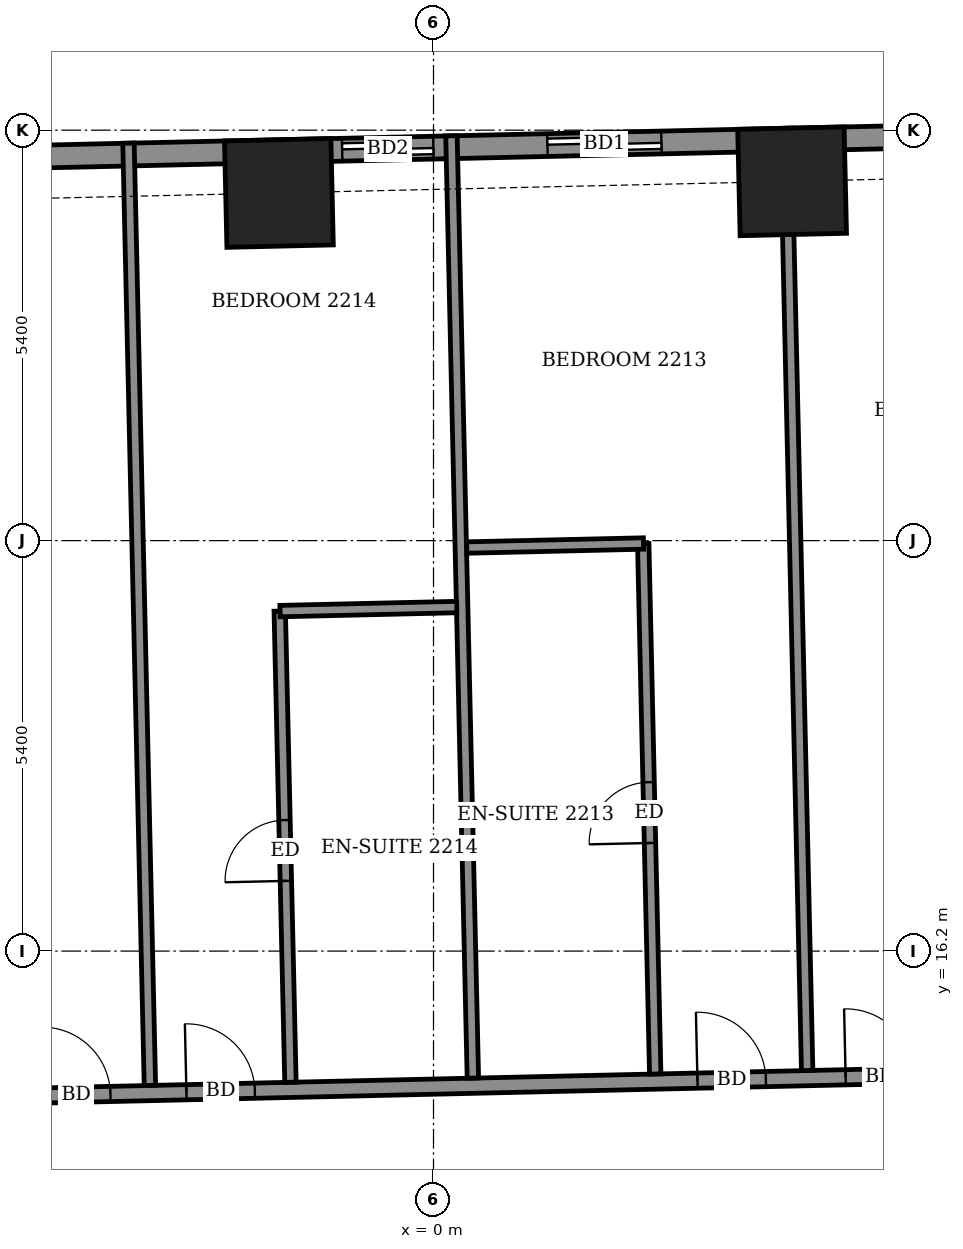
"""IFC4 building model, lengths in metres.
Left out: names, types, materials, properties, quantities, classifications, styles, units other than length and angle.
Written with IfcOpenShell. Run it as: python <this file> out.ifc"""

import sys

from ifc_helpers import new_model, si_unit, direction, frame, frame_2d, origin, origin_2d, place, context, subcontext, project, spatial, rectangle, extrude, element, fill, save


model = new_model("IFC4")
c1 = context("Model", 3, precision=1e-05, world=origin(), true_north=direction((0.0, 1.0)))
c2 = subcontext(c1, "Body", "Model", "MODEL_VIEW")
j1 = project(units=[si_unit("LENGTHUNIT", "METRE"), si_unit("PLANEANGLEUNIT", "RADIAN")], contexts=[c1])
p1 = place(None, origin())
s1 = spatial("IfcSite", under=j1, at=p1, CompositionType="ELEMENT")
p2 = place(p1, origin())
s2 = spatial("IfcBuilding", under=s1, at=p2, CompositionType="ELEMENT")
p3 = place(p2, frame((0.0, 0.0, 90.1)))
s3 = spatial("IfcBuildingStorey", under=s2, at=p3, CompositionType="ELEMENT", Elevation=90.1)
for number, where, z_axis, x_axis in (
    (1, (4.718, 26.327, -0.55), (0.0, 0.0, 1.0), (-1.0, -0.023, 0.0)),
    (2, (-2.034, 26.174, -0.55), (0.0, 0.0, 1.0), (-1.0, -0.023, 0.0)),
):
    element("IfcColumn", number, at=place(p3, frame(where, z_axis=z_axis, x_axis=x_axis)), inside=s3, PredefinedType="COLUMN", context=c2, shape_type="SweptSolid", body=[
        extrude(rectangle(XDim=1.4, YDim=1.4, at=origin_2d()), origin(), (0.0, 0.0, 1.0), 3.6),
    ])
p4 = place(p3, frame((24.809, 27.333, 0.0), z_axis=(0.0, 0.0, 1.0), x_axis=(-0.999742489858, -0.022692597327, 0.0)))
e3 = element("IfcWall", 3, at=p4, inside=s3, PredefinedType="SOLIDWALL", context=c2, shape_type="SweptSolid", body=[
    extrude(rectangle(XDim=46.972, YDim=0.3, at=frame_2d((23.486, 0.0))), origin(), (0.0, 0.0, 1.0), 3.05),
])
p5 = place(p4, frame((1.311, 0.0, 0.0)))
e4 = element("IfcOpeningElement", 4, at=p5, cuts=e3, PredefinedType="OPENING", context=c2, shape_type="SweptSolid", body=[
    extrude(rectangle(XDim=1.2, YDim=2.4, at=frame_2d((0.6, 1.2))), frame((0.0, 0.16, 0.0), z_axis=(0.0, -1.0, 0.0), x_axis=(1.0, 0.0, 0.0)), (0.0, 0.0, 1.0), 0.32),
])
p6 = place(p4, frame((3.763, 0.0, 0.0)))
e5 = element("IfcOpeningElement", 5, at=p6, cuts=e3, PredefinedType="OPENING", context=c2, shape_type="SweptSolid", body=[
    extrude(rectangle(XDim=1.5, YDim=2.4, at=frame_2d((0.75, 1.2))), frame((0.0, 0.16, 0.0), z_axis=(0.0, -1.0, 0.0), x_axis=(1.0, 0.0, 0.0)), (0.0, 0.0, 1.0), 0.32),
])
p7 = place(p4, frame((8.647, 0.0, 0.0)))
e6 = element("IfcOpeningElement", 6, at=p7, cuts=e3, PredefinedType="OPENING", context=c2, shape_type="SweptSolid", body=[
    extrude(rectangle(XDim=1.5, YDim=2.4, at=frame_2d((0.75, 1.2))), frame((0.0, 0.16, 0.0), z_axis=(0.0, -1.0, 0.0), x_axis=(1.0, 0.0, 0.0)), (0.0, 0.0, 1.0), 0.32),
])
p8 = place(p4, frame((14.239, 0.0, 0.0)))
e7 = element("IfcOpeningElement", 7, at=p8, cuts=e3, PredefinedType="OPENING", context=c2, shape_type="SweptSolid", body=[
    extrude(rectangle(XDim=1.2, YDim=2.4, at=frame_2d((0.6, 1.2))), frame((0.0, 0.16, 0.0), z_axis=(0.0, -1.0, 0.0), x_axis=(1.0, 0.0, 0.0)), (0.0, 0.0, 1.0), 0.32),
])
p9 = place(p4, frame((17.016, 0.0, 0.0)))
e8 = element("IfcOpeningElement", 8, at=p9, cuts=e3, PredefinedType="OPENING", context=c2, shape_type="SweptSolid", body=[
    extrude(rectangle(XDim=1.5, YDim=2.4, at=frame_2d((0.75, 1.2))), frame((0.0, 0.16, 0.0), z_axis=(0.0, -1.0, 0.0), x_axis=(1.0, 0.0, 0.0)), (0.0, 0.0, 1.0), 0.32),
])
p10 = place(p4, frame((21.816, 0.0, 0.0)))
e9 = element("IfcOpeningElement", 9, at=p10, cuts=e3, PredefinedType="OPENING", context=c2, shape_type="SweptSolid", body=[
    extrude(rectangle(XDim=1.5, YDim=2.4, at=frame_2d((0.75, 1.2))), frame((0.0, 0.16, 0.0), z_axis=(0.0, -1.0, 0.0), x_axis=(1.0, 0.0, 0.0)), (0.0, 0.0, 1.0), 0.32),
])
p11 = place(p4, frame((24.817, 0.0, 0.0)))
e10 = element("IfcOpeningElement", 10, at=p11, cuts=e3, PredefinedType="OPENING", context=c2, shape_type="SweptSolid", body=[
    extrude(rectangle(XDim=1.2, YDim=2.4, at=frame_2d((0.6, 1.2))), frame((0.0, 0.16, 0.0), z_axis=(0.0, -1.0, 0.0), x_axis=(1.0, 0.0, 0.0)), (0.0, 0.0, 1.0), 0.32),
])
p12 = place(p4, frame((30.244, 0.0, 0.0)))
e11 = element("IfcOpeningElement", 11, at=p12, cuts=e3, PredefinedType="OPENING", context=c2, shape_type="SweptSolid", body=[
    extrude(rectangle(XDim=1.5, YDim=2.4, at=frame_2d((0.75, 1.2))), frame((0.0, 0.16, 0.0), z_axis=(0.0, -1.0, 0.0), x_axis=(1.0, 0.0, 0.0)), (0.0, 0.0, 1.0), 0.32),
])
p13 = place(p4, frame((35.069, 0.0, 0.0)))
e12 = element("IfcOpeningElement", 12, at=p13, cuts=e3, PredefinedType="OPENING", context=c2, shape_type="SweptSolid", body=[
    extrude(rectangle(XDim=1.5, YDim=2.4, at=frame_2d((0.75, 1.2))), frame((0.0, 0.16, 0.0), z_axis=(0.0, -1.0, 0.0), x_axis=(1.0, 0.0, 0.0)), (0.0, 0.0, 1.0), 0.32),
])
p14 = place(p4, frame((37.995, 0.0, 0.0)))
e13 = element("IfcOpeningElement", 13, at=p14, cuts=e3, PredefinedType="OPENING", context=c2, shape_type="SweptSolid", body=[
    extrude(rectangle(XDim=1.5, YDim=2.4, at=frame_2d((0.75, 1.2))), frame((0.0, 0.16, 0.0), z_axis=(0.0, -1.0, 0.0), x_axis=(1.0, 0.0, 0.0)), (0.0, 0.0, 1.0), 0.32),
])
p15 = place(p4, frame((42.674, 0.0, 0.9)))
e14 = element("IfcOpeningElement", 14, at=p15, cuts=e3, PredefinedType="OPENING", context=c2, shape_type="SweptSolid", body=[
    extrude(rectangle(XDim=2.4, YDim=1.5, at=frame_2d((1.2, 0.75))), frame((0.0, 0.16, 0.0), z_axis=(0.0, -1.0, 0.0), x_axis=(1.0, 0.0, 0.0)), (0.0, 0.0, 1.0), 0.32),
])
p16 = place(p3, frame((-24.92, 13.851, 0.0), z_axis=(0.0, 0.0, 1.0), x_axis=(0.999742411711, 0.022696039895, 0.0)))
e15 = element("IfcWall", 15, at=p16, inside=s3, PredefinedType="PARTITIONING", context=c2, shape_type="SweptSolid", body=[
    extrude(rectangle(XDim=52.472, YDim=0.2, at=frame_2d((26.236, 0.0))), origin(), (0.0, 0.0, 1.0), 3.05),
])
p17 = place(p16, frame((50.088, 0.0, 0.0)))
e16 = element("IfcOpeningElement", 16, at=p17, cuts=e15, PredefinedType="OPENING", context=c2, shape_type="SweptSolid", body=[
    extrude(rectangle(XDim=1.0, YDim=2.1, at=frame_2d((0.5, 1.05))), frame((0.0, 0.11, 0.0), z_axis=(0.0, -1.0, 0.0), x_axis=(1.0, 0.0, 0.0)), (0.0, 0.0, 1.0), 0.22),
])
p18 = place(p16, frame((45.725, 0.0, 0.0)))
e17 = element("IfcOpeningElement", 17, at=p18, cuts=e15, PredefinedType="OPENING", context=c2, shape_type="SweptSolid", body=[
    extrude(rectangle(XDim=0.9, YDim=2.1, at=frame_2d((0.45, 1.05))), frame((0.0, 0.11, 0.0), z_axis=(0.0, -1.0, 0.0), x_axis=(1.0, 0.0, 0.0)), (0.0, 0.0, 1.0), 0.22),
])
p19 = place(p16, frame((38.975, 0.0, 0.0)))
e18 = element("IfcOpeningElement", 18, at=p19, cuts=e15, PredefinedType="OPENING", context=c2, shape_type="SweptSolid", body=[
    extrude(rectangle(XDim=0.9, YDim=2.1, at=frame_2d((0.45, 1.05))), frame((0.0, 0.11, 0.0), z_axis=(0.0, -1.0, 0.0), x_axis=(1.0, 0.0, 0.0)), (0.0, 0.0, 1.0), 0.22),
])
p20 = place(p16, frame((37.05, 0.0, 0.0)))
e19 = element("IfcOpeningElement", 19, at=p20, cuts=e15, PredefinedType="OPENING", context=c2, shape_type="SweptSolid", body=[
    extrude(rectangle(XDim=0.9, YDim=2.1, at=frame_2d((0.45, 1.05))), frame((0.0, 0.11, 0.0), z_axis=(0.0, -1.0, 0.0), x_axis=(1.0, 0.0, 0.0)), (0.0, 0.0, 1.0), 0.22),
])
p21 = place(p16, frame((30.35, 0.0, 0.0)))
e20 = element("IfcOpeningElement", 20, at=p21, cuts=e15, PredefinedType="OPENING", context=c2, shape_type="SweptSolid", body=[
    extrude(rectangle(XDim=0.9, YDim=2.1, at=frame_2d((0.45, 1.05))), frame((0.0, 0.11, 0.0), z_axis=(0.0, -1.0, 0.0), x_axis=(1.0, 0.0, 0.0)), (0.0, 0.0, 1.0), 0.22),
])
p22 = place(p16, frame((28.4, 0.0, 0.0)))
e21 = element("IfcOpeningElement", 21, at=p22, cuts=e15, PredefinedType="OPENING", context=c2, shape_type="SweptSolid", body=[
    extrude(rectangle(XDim=0.9, YDim=2.1, at=frame_2d((0.45, 1.05))), frame((0.0, 0.11, 0.0), z_axis=(0.0, -1.0, 0.0), x_axis=(1.0, 0.0, 0.0)), (0.0, 0.0, 1.0), 0.22),
])
p23 = place(p16, frame((21.675, 0.0, 0.0)))
e22 = element("IfcOpeningElement", 22, at=p23, cuts=e15, PredefinedType="OPENING", context=c2, shape_type="SweptSolid", body=[
    extrude(rectangle(XDim=0.9, YDim=2.1, at=frame_2d((0.45, 1.05))), frame((0.0, 0.11, 0.0), z_axis=(0.0, -1.0, 0.0), x_axis=(1.0, 0.0, 0.0)), (0.0, 0.0, 1.0), 0.22),
])
p24 = place(p16, frame((19.775, 0.0, 0.0)))
e23 = element("IfcOpeningElement", 23, at=p24, cuts=e15, PredefinedType="OPENING", context=c2, shape_type="SweptSolid", body=[
    extrude(rectangle(XDim=0.9, YDim=2.1, at=frame_2d((0.45, 1.05))), frame((0.0, 0.11, 0.0), z_axis=(0.0, -1.0, 0.0), x_axis=(1.0, 0.0, 0.0)), (0.0, 0.0, 1.0), 0.22),
])
p25 = place(p16, frame((13.0, 0.0, 0.0)))
e24 = element("IfcOpeningElement", 24, at=p25, cuts=e15, PredefinedType="OPENING", context=c2, shape_type="SweptSolid", body=[
    extrude(rectangle(XDim=0.9, YDim=2.1, at=frame_2d((0.45, 1.05))), frame((0.0, 0.11, 0.0), z_axis=(0.0, -1.0, 0.0), x_axis=(1.0, 0.0, 0.0)), (0.0, 0.0, 1.0), 0.22),
])
p26 = place(p16, frame((11.075, 0.0, 0.0)))
e25 = element("IfcOpeningElement", 25, at=p26, cuts=e15, PredefinedType="OPENING", context=c2, shape_type="SweptSolid", body=[
    extrude(rectangle(XDim=0.9, YDim=2.1, at=frame_2d((0.45, 1.05))), frame((0.0, 0.11, 0.0), z_axis=(0.0, -1.0, 0.0), x_axis=(1.0, 0.0, 0.0)), (0.0, 0.0, 1.0), 0.22),
])
p27 = place(p16, frame((3.049, 0.0, 0.0)))
e26 = element("IfcOpeningElement", 26, at=p27, cuts=e15, PredefinedType="OPENING", context=c2, shape_type="SweptSolid", body=[
    extrude(rectangle(XDim=1.0, YDim=2.1, at=frame_2d((0.5, 1.05))), frame((0.0, 0.11, 0.0), z_axis=(0.0, -1.0, 0.0), x_axis=(1.0, 0.0, 0.0)), (0.0, 0.0, 1.0), 0.22),
])
p28 = place(p3, frame((-3.731, 14.432, 0.0), z_axis=(0.0, 0.0, 1.0), x_axis=(-0.022739741597, 0.999741418644, 0.0)))
e27 = element("IfcWall", 27, at=p28, inside=s3, PredefinedType="PARTITIONING", context=c2, shape_type="SweptSolid", body=[
    extrude(rectangle(XDim=12.4, YDim=0.15, at=frame_2d((6.2, 0.0))), origin(), (0.0, 0.0, 1.0), 2.55),
])
p29 = place(p3, frame((-1.882, 14.474, 0.0), z_axis=(0.0, 0.0, 1.0), x_axis=(-0.022718722157, 0.999741896523, 0.0)))
e28 = element("IfcWall", 28, at=p29, inside=s3, PredefinedType="PARTITIONING", context=c2, shape_type="SweptSolid", body=[
    extrude(rectangle(XDim=6.201, YDim=0.15, at=frame_2d((3.1, 0.0))), origin(), (0.0, 0.0, 1.0), 3.05),
])
p30 = place(p29, frame((2.65, 0.0, 0.0)))
e29 = element("IfcOpeningElement", 29, at=p30, cuts=e28, PredefinedType="OPENING", context=c2, shape_type="SweptSolid", body=[
    extrude(rectangle(XDim=0.8, YDim=2.1, at=frame_2d((0.4, 1.05))), frame((0.0, 0.085, 0.0), z_axis=(0.0, -1.0, 0.0), x_axis=(1.0, 0.0, 0.0)), (0.0, 0.0, 1.0), 0.17),
])
p31 = place(p3, frame((0.518, 14.529, 0.0), z_axis=(0.0, 0.0, 1.0), x_axis=(-0.022740189192, 0.999741408463, 0.0)))
e30 = element("IfcWall", 30, at=p31, inside=s3, PredefinedType="PARTITIONING", context=c2, shape_type="SweptSolid", body=[
    extrude(rectangle(XDim=12.4, YDim=0.15, at=frame_2d((6.2, 0.0))), origin(), (0.0, 0.0, 1.0), 2.55),
])
p32 = place(p3, frame((2.917, 14.583, 0.0), z_axis=(0.0, 0.0, 1.0), x_axis=(-0.022630826984, 0.999743890039, 0.0)))
e31 = element("IfcWall", 31, at=p32, inside=s3, PredefinedType="PARTITIONING", context=c2, shape_type="SweptSolid", body=[
    extrude(rectangle(XDim=6.98, YDim=0.15, at=frame_2d((3.49, 0.0))), origin(), (0.0, 0.0, 1.0), 3.05),
])
p33 = place(p32, frame((3.04, 0.0, 0.0)))
e32 = element("IfcOpeningElement", 32, at=p33, cuts=e31, PredefinedType="OPENING", context=c2, shape_type="SweptSolid", body=[
    extrude(rectangle(XDim=0.8, YDim=2.1, at=frame_2d((0.4, 1.05))), frame((0.0, 0.085, 0.0), z_axis=(0.0, -1.0, 0.0), x_axis=(1.0, 0.0, 0.0)), (0.0, 0.0, 1.0), 0.17),
])
p34 = place(p3, frame((4.916, 14.629, 0.0), z_axis=(0.0, 0.0, 1.0), x_axis=(-0.022663260168, 0.999743155335, 0.0)))
e33 = element("IfcWall", 33, at=p34, inside=s3, PredefinedType="PARTITIONING", context=c2, shape_type="SweptSolid", body=[
    extrude(rectangle(XDim=12.399, YDim=0.15, at=frame_2d((6.2, 0.0))), origin(), (0.0, 0.0, 1.0), 3.05),
])
for number, where, z_axis, x_axis in (
    (34, (-2.019, 20.673, 0.0), (0.0, 0.0, 1.0), (1.0, 0.023, 0.0)),
    (35, (0.438, 21.509, 0.0), (0.0, 0.0, 1.0), (1.0, 0.023, 0.0)),
):
    element("IfcWall", number, at=place(p3, frame(where, z_axis=z_axis, x_axis=x_axis)), inside=s3, PredefinedType="PARTITIONING", context=c2, shape_type="SweptSolid", body=[
        extrude(rectangle(XDim=2.325, YDim=0.15, at=frame_2d((1.163, 0.0))), origin(), (0.0, 0.0, 1.0), 3.05),
    ])
p35 = place(p10, origin())
e36 = element("IfcDoor", 36, at=p35, inside=s3, OperationType="SLIDING_TO_LEFT", PredefinedType="DOOR", context=c2, shape_type="SweptSolid", body=[
    extrude(rectangle(XDim=1.5, YDim=2.4, at=frame_2d((0.75, 1.2))), frame((0.0, 0.025, 0.0), z_axis=(0.0, -1.0, 0.0), x_axis=(1.0, 0.0, 0.0)), (0.0, 0.0, 1.0), 0.05),
])
fill(e9, e36)
p36 = place(p11, origin())
e37 = element("IfcDoor", 37, at=p36, inside=s3, OperationType="SLIDING_TO_LEFT", PredefinedType="DOOR", context=c2, shape_type="SweptSolid", body=[
    extrude(rectangle(XDim=1.2, YDim=2.4, at=frame_2d((0.6, 1.2))), frame((0.0, 0.025, 0.0), z_axis=(0.0, -1.0, 0.0), x_axis=(1.0, 0.0, 0.0)), (0.0, 0.0, 1.0), 0.05),
])
fill(e10, e37)
p37 = place(p21, origin())
e38 = element("IfcDoor", 38, at=p37, inside=s3, OperationType="SINGLE_SWING_RIGHT", PredefinedType="DOOR", context=c2, shape_type="SweptSolid", body=[
    extrude(rectangle(XDim=0.9, YDim=2.1, at=frame_2d((0.45, 1.05))), frame((0.0, 0.025, 0.0), z_axis=(0.0, -1.0, 0.0), x_axis=(1.0, 0.0, 0.0)), (0.0, 0.0, 1.0), 0.05),
])
fill(e20, e38)
p38 = place(p22, origin())
e39 = element("IfcDoor", 39, at=p38, inside=s3, OperationType="SINGLE_SWING_LEFT", PredefinedType="DOOR", context=c2, shape_type="SweptSolid", body=[
    extrude(rectangle(XDim=0.9, YDim=2.1, at=frame_2d((0.45, 1.05))), frame((0.0, 0.025, 0.0), z_axis=(0.0, -1.0, 0.0), x_axis=(1.0, 0.0, 0.0)), (0.0, 0.0, 1.0), 0.05),
])
fill(e21, e39)
p39 = place(p33, origin())
e40 = element("IfcDoor", 40, at=p39, inside=s3, OperationType="SINGLE_SWING_LEFT", PredefinedType="DOOR", context=c2, shape_type="SweptSolid", body=[
    extrude(rectangle(XDim=0.8, YDim=2.1, at=frame_2d((0.4, 1.05))), frame((0.0, 0.025, 0.0), z_axis=(0.0, -1.0, 0.0), x_axis=(1.0, 0.0, 0.0)), (0.0, 0.0, 1.0), 0.05),
])
fill(e32, e40)
p40 = place(p23, origin())
e41 = element("IfcDoor", 41, at=p40, inside=s3, OperationType="SINGLE_SWING_RIGHT", PredefinedType="DOOR", context=c2, shape_type="SweptSolid", body=[
    extrude(rectangle(XDim=0.9, YDim=2.1, at=frame_2d((0.45, 1.05))), frame((0.0, 0.025, 0.0), z_axis=(0.0, -1.0, 0.0), x_axis=(1.0, 0.0, 0.0)), (0.0, 0.0, 1.0), 0.05),
])
fill(e22, e41)
p41 = place(p30, origin())
e42 = element("IfcDoor", 42, at=p41, inside=s3, OperationType="SINGLE_SWING_RIGHT", PredefinedType="DOOR", context=c2, shape_type="SweptSolid", body=[
    extrude(rectangle(XDim=0.8, YDim=2.1, at=frame_2d((0.4, 1.05))), frame((0.0, 0.025, 0.0), z_axis=(0.0, -1.0, 0.0), x_axis=(1.0, 0.0, 0.0)), (0.0, 0.0, 1.0), 0.05),
])
fill(e29, e42)
p42 = place(p24, origin())
e43 = element("IfcDoor", 43, at=p42, inside=s3, OperationType="SINGLE_SWING_LEFT", PredefinedType="DOOR", context=c2, shape_type="SweptSolid", body=[
    extrude(rectangle(XDim=0.9, YDim=2.1, at=frame_2d((0.45, 1.05))), frame((0.0, 0.025, 0.0), z_axis=(0.0, -1.0, 0.0), x_axis=(1.0, 0.0, 0.0)), (0.0, 0.0, 1.0), 0.05),
])
fill(e23, e43)
save(model, sys.argv[1])
